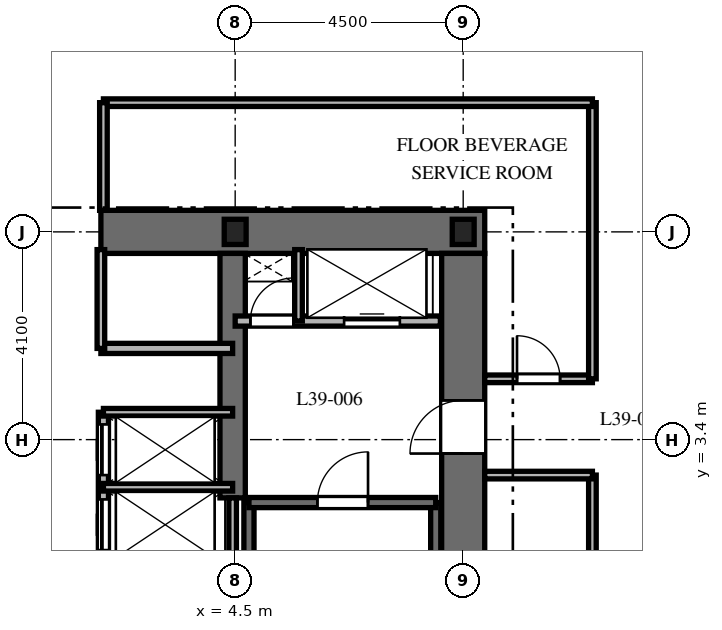
"""IFC4 building model, lengths in metres.
Left out: names, types, materials, properties, quantities, classifications, styles, units other than length and angle.
Written with IfcOpenShell. Run it as: python <this file> out.ifc"""

import sys

from ifc_helpers import new_model, si_unit, direction, frame, frame_2d, origin, origin_2d, place, context, subcontext, project, spatial, rectangle, i_section, extrude, element, fill, save


model = new_model("IFC4")
c1 = context("Model", 3, precision=1e-05, world=origin(), true_north=direction((0.0, 1.0)))
c2 = subcontext(c1, "Body", "Model", "MODEL_VIEW")
j1 = project(units=[si_unit("LENGTHUNIT", "METRE"), si_unit("PLANEANGLEUNIT", "RADIAN")], contexts=[c1])
p1 = place(None, origin())
s1 = spatial("IfcSite", under=j1, at=p1, CompositionType="ELEMENT")
p2 = place(p1, origin())
s2 = spatial("IfcBuilding", under=s1, at=p2, CompositionType="ELEMENT")
p3 = place(p2, frame((0.0, 0.0, 159.1)))
s3 = spatial("IfcBuildingStorey", under=s2, at=p3, CompositionType="ELEMENT", Elevation=159.1)
p4 = place(p3, frame((1.85, 7.5, 0.0), z_axis=(0.0, 0.0, 1.0), x_axis=(1.0, 0.0, 0.0)))
e1 = element("IfcWall", 1, at=p4, inside=s3, PredefinedType="SHEAR", context=c2, shape_type="SweptSolid", body=[
    extrude(rectangle(XDim=7.575, YDim=0.85, at=frame_2d((3.788, 0.0))), origin(), (0.0, 0.0, 1.0), 3.7),
])
p5 = place(p3, frame((9.0, -7.075, 0.0), z_axis=(0.0, 0.0, 1.0), x_axis=(0.0, 1.0, 0.0)))
e2 = element("IfcWall", 2, at=p5, inside=s3, PredefinedType="SHEAR", context=c2, shape_type="SweptSolid", body=[
    extrude(rectangle(XDim=14.15, YDim=0.85, at=frame_2d((7.075, 0.0))), origin(), (0.0, 0.0, 1.0), 3.7),
])
p6 = place(p5, frame((10.2, 0.0, 0.0)))
e3 = element("IfcOpeningElement", 3, at=p6, cuts=e2, PredefinedType="OPENING", context=c2, shape_type="SweptSolid", body=[
    extrude(rectangle(XDim=1.05, YDim=2.15, at=frame_2d((0.525, 1.075))), frame((0.0, 0.435, 0.0), z_axis=(0.0, -1.0, 0.0), x_axis=(1.0, 0.0, 0.0)), (0.0, 0.0, 1.0), 0.87),
])
p7 = place(p3, frame((4.45, 2.25, 0.0), z_axis=(0.0, 0.0, 1.0), x_axis=(0.0, 1.0, 0.0)))
e4 = element("IfcWall", 4, at=p7, inside=s3, PredefinedType="SHEAR", context=c2, shape_type="SweptSolid", body=[
    extrude(rectangle(XDim=4.825, YDim=0.5, at=frame_2d((2.413, 0.0))), origin(), (0.0, 0.0, 1.0), 3.7),
])
for number, where, z_axis, x_axis in (
    (5, (4.772, -6.985, 0.0), (0.0, 0.0, 1.0), (0.0, 1.0, 0.0)),
    (6, (8.458, -6.985, 0.0), (0.0, 0.0, 1.0), (0.0, 1.0, 0.0)),
):
    element("IfcWall", number, at=place(p3, frame(where, z_axis=z_axis, x_axis=x_axis)), inside=s3, PredefinedType="SHEAR", context=c2, shape_type="SweptSolid", body=[
        extrude(rectangle(XDim=9.143, YDim=0.2, at=frame_2d((4.572, 0.0))), origin(), (0.0, 0.0, 1.0), 3.7),
    ])
p8 = place(p3, frame((4.772, 2.158, 0.0), z_axis=(0.0, 0.0, 1.0), x_axis=(1.0, 0.0, 0.0)))
e7 = element("IfcWall", 7, at=p8, inside=s3, PredefinedType="SHEAR", context=c2, shape_type="SweptSolid", body=[
    extrude(rectangle(XDim=3.686, YDim=0.2, at=frame_2d((1.843, 0.0))), origin(), (0.0, 0.0, 1.0), 3.7),
])
p9 = place(p8, frame((1.35, 0.0, 0.0)))
e8 = element("IfcOpeningElement", 8, at=p9, cuts=e7, PredefinedType="OPENING", context=c2, shape_type="SweptSolid", body=[
    extrude(rectangle(XDim=1.0, YDim=2.15, at=frame_2d((0.5, 1.075))), frame((0.0, 0.11, 0.0), z_axis=(0.0, -1.0, 0.0), x_axis=(1.0, 0.0, 0.0)), (0.0, 0.0, 1.0), 0.22),
])
for number, where, z_axis, x_axis in (
    (9, (9.0, 7.5, 0.0), (0.0, 0.0, 1.0), (1.0, 0.0, 0.0)),
    (10, (4.5, 7.5, 0.0), (0.0, 0.0, 1.0), (1.0, 0.0, 0.0)),
):
    element("IfcColumn", number, at=place(p3, frame(where, z_axis=z_axis, x_axis=x_axis)), inside=s3, PredefinedType="COLUMN", context=c2, shape_type="SweptSolid", body=[
        extrude(i_section(OverallWidth=0.432, OverallDepth=0.498, WebThickness=0.056, FlangeThickness=0.089, at=origin_2d()), origin(), (0.0, 0.0, 1.0), 3.7),
    ])
p10 = place(p3, frame((4.5, 5.74, 0.0), z_axis=(0.0, 0.0, 1.0), x_axis=(1.0, 0.0, 0.0)))
e11 = element("IfcWall", 11, at=p10, inside=s3, PredefinedType="PARTITIONING", context=c2, shape_type="SweptSolid", body=[
    extrude(rectangle(XDim=4.05, YDim=0.2, at=frame_2d((2.025, 0.0))), origin(), (0.0, 0.0, 1.0), 3.4),
])
p11 = place(p10, frame((0.3, 0.0, 0.0)))
e12 = element("IfcOpeningElement", 12, at=p11, cuts=e11, PredefinedType="OPENING", context=c2, shape_type="SweptSolid", body=[
    extrude(rectangle(XDim=0.85, YDim=2.03, at=frame_2d((0.425, 1.015))), frame((0.0, 0.11, 0.0), z_axis=(0.0, -1.0, 0.0), x_axis=(1.0, 0.0, 0.0)), (0.0, 0.0, 1.0), 0.22),
])
p12 = place(p10, frame((2.15, 0.0, 0.0)))
e13 = element("IfcOpeningElement", 13, at=p12, cuts=e11, PredefinedType="OPENING", context=c2, shape_type="SweptSolid", body=[
    extrude(rectangle(XDim=1.1, YDim=2.2, at=frame_2d((0.55, 1.1))), frame((0.0, 0.11, 0.0), z_axis=(0.0, -1.0, 0.0), x_axis=(1.0, 0.0, 0.0)), (0.0, 0.0, 1.0), 0.22),
])
p13 = place(p3, frame((5.75, 5.74, 0.0), z_axis=(0.0, 0.0, 1.0), x_axis=(0.0, 1.0, 0.0)))
e14 = element("IfcWall", 14, at=p13, inside=s3, PredefinedType="PARTITIONING", context=c2, shape_type="SweptSolid", body=[
    extrude(rectangle(XDim=1.41, YDim=0.15, at=frame_2d((0.705, 0.0))), origin(), (0.0, 0.0, 1.0), 3.4),
])
p14 = place(p3, frame((1.85, 5.2, 0.0), z_axis=(0.0, 0.0, 1.0), x_axis=(1.0, 0.0, 0.0)))
e15 = element("IfcWall", 15, at=p14, inside=s3, PredefinedType="PARTITIONING", context=c2, shape_type="SweptSolid", body=[
    extrude(rectangle(XDim=2.6, YDim=0.2, at=frame_2d((1.3, 0.0))), origin(), (0.0, 0.0, 1.0), 3.4),
])
p15 = place(p3, frame((1.85, 5.2, 0.0), z_axis=(0.0, 0.0, 1.0), x_axis=(0.0, 1.0, 0.0)))
e16 = element("IfcWall", 16, at=p15, inside=s3, PredefinedType="PARTITIONING", context=c2, shape_type="SweptSolid", body=[
    extrude(rectangle(XDim=1.95, YDim=0.15, at=frame_2d((0.975, 0.0))), origin(), (0.0, 0.0, 1.0), 3.4),
])
p16 = place(p3, frame((4.45, -1.972, 0.0), z_axis=(0.0, 0.0, 1.0), x_axis=(0.0, 1.0, 0.0)))
e17 = element("IfcWall", 17, at=p16, inside=s3, PredefinedType="PARTITIONING", context=c2, shape_type="SweptSolid", body=[
    extrude(rectangle(XDim=4.222, YDim=0.15, at=frame_2d((2.111, 0.0))), origin(), (0.0, 0.0, 1.0), 3.4),
])
p17 = place(p3, frame((1.9, -0.5, 0.0), z_axis=(0.0, 0.0, 1.0), x_axis=(0.0, 1.0, 0.0)))
e18 = element("IfcWall", 18, at=p17, inside=s3, PredefinedType="PARTITIONING", context=c2, shape_type="SweptSolid", body=[
    extrude(rectangle(XDim=4.44, YDim=0.2, at=frame_2d((2.22, 0.0))), origin(), (0.0, 0.0, 1.0), 3.4),
])
p18 = place(p17, frame((0.24, 0.0, 0.0)))
e19 = element("IfcOpeningElement", 19, at=p18, cuts=e18, PredefinedType="OPENING", context=c2, shape_type="SweptSolid", body=[
    extrude(rectangle(XDim=1.0, YDim=2.2, at=frame_2d((0.5, 1.1))), frame((0.0, 0.11, 0.0), z_axis=(0.0, -1.0, 0.0), x_axis=(1.0, 0.0, 0.0)), (0.0, 0.0, 1.0), 0.22),
])
p19 = place(p17, frame((1.72, 0.0, 0.0)))
e20 = element("IfcOpeningElement", 20, at=p19, cuts=e18, PredefinedType="OPENING", context=c2, shape_type="SweptSolid", body=[
    extrude(rectangle(XDim=1.0, YDim=2.2, at=frame_2d((0.5, 1.1))), frame((0.0, 0.11, 0.0), z_axis=(0.0, -1.0, 0.0), x_axis=(1.0, 0.0, 0.0)), (0.0, 0.0, 1.0), 0.22),
])
p20 = place(p17, frame((3.2, 0.0, 0.0)))
e21 = element("IfcOpeningElement", 21, at=p20, cuts=e18, PredefinedType="OPENING", context=c2, shape_type="SweptSolid", body=[
    extrude(rectangle(XDim=1.0, YDim=2.2, at=frame_2d((0.5, 1.1))), frame((0.0, 0.11, 0.0), z_axis=(0.0, -1.0, 0.0), x_axis=(1.0, 0.0, 0.0)), (0.0, 0.0, 1.0), 0.22),
])
for number, where, z_axis, x_axis in (
    (22, (1.9, 3.94, 0.0), (0.0, 0.0, 1.0), (1.0, 0.0, 0.0)),
    (23, (1.9, 2.46, 0.0), (0.0, 0.0, 1.0), (1.0, 0.0, 0.0)),
):
    element("IfcWall", number, at=place(p3, frame(where, z_axis=z_axis, x_axis=x_axis)), inside=s3, PredefinedType="PARTITIONING", context=c2, shape_type="SweptSolid", body=[
        extrude(rectangle(XDim=2.55, YDim=0.15, at=frame_2d((1.275, 0.0))), origin(), (0.0, 0.0, 1.0), 3.4),
    ])
p21 = place(p3, frame((11.55, -10.05, 0.0), z_axis=(0.0, 0.0, 1.0), x_axis=(0.0, 1.0, 0.0)))
e24 = element("IfcWall", 24, at=p21, inside=s3, PredefinedType="PARTITIONING", context=c2, shape_type="SweptSolid", body=[
    extrude(rectangle(XDim=12.75, YDim=0.15, at=frame_2d((6.375, 0.0))), origin(), (0.0, 0.0, 1.0), 2.84),
])
p22 = place(p21, frame((5.95, 0.0, 0.0)))
e25 = element("IfcOpeningElement", 25, at=p22, cuts=e24, PredefinedType="OPENING", context=c2, shape_type="SweptSolid", body=[
    extrude(rectangle(XDim=0.85, YDim=2.03, at=frame_2d((0.425, 1.015))), frame((0.0, 0.085, 0.0), z_axis=(0.0, -1.0, 0.0), x_axis=(1.0, 0.0, 0.0)), (0.0, 0.0, 1.0), 0.17),
])
p23 = place(p3, frame((11.55, 2.7, 0.0), z_axis=(0.0, 0.0, 1.0), x_axis=(-1.0, 0.0, 0.0)))
e26 = element("IfcWall", 26, at=p23, inside=s3, PredefinedType="PARTITIONING", context=c2, shape_type="SweptSolid", body=[
    extrude(rectangle(XDim=2.125, YDim=0.15, at=frame_2d((1.062, 0.0))), origin(), (0.0, 0.0, 1.0), 3.4),
])
p24 = place(p3, frame((9.425, 4.6, 0.0), z_axis=(0.0, 0.0, 1.0), x_axis=(1.0, 0.0, 0.0)))
e27 = element("IfcWall", 27, at=p24, inside=s3, PredefinedType="PARTITIONING", context=c2, shape_type="SweptSolid", body=[
    extrude(rectangle(XDim=2.125, YDim=0.15, at=frame_2d((1.062, 0.0))), origin(), (0.0, 0.0, 1.0), 3.4),
])
p25 = place(p24, frame((0.637, 0.0, 0.0)))
e28 = element("IfcOpeningElement", 28, at=p25, cuts=e27, PredefinedType="OPENING", context=c2, shape_type="SweptSolid", body=[
    extrude(rectangle(XDim=0.85, YDim=2.03, at=frame_2d((0.425, 1.015))), frame((0.0, 0.085, 0.0), z_axis=(0.0, -1.0, 0.0), x_axis=(1.0, 0.0, 0.0)), (0.0, 0.0, 1.0), 0.17),
])
p26 = place(p3, frame((11.55, 4.6, 0.0), z_axis=(0.0, 0.0, 1.0), x_axis=(0.0, 1.0, 0.0)))
e29 = element("IfcWall", 29, at=p26, inside=s3, PredefinedType="PARTITIONING", context=c2, shape_type="SweptSolid", body=[
    extrude(rectangle(XDim=5.45, YDim=0.15, at=frame_2d((2.725, 0.0))), origin(), (0.0, 0.0, 1.0), 2.84),
])
p27 = place(p3, frame((11.55, 10.05, 0.0), z_axis=(0.0, 0.0, 1.0), x_axis=(-1.0, 0.0, 0.0)))
e30 = element("IfcWall", 30, at=p27, inside=s3, PredefinedType="PARTITIONING", context=c2, shape_type="SweptSolid", body=[
    extrude(rectangle(XDim=9.65, YDim=0.15, at=frame_2d((4.825, 0.0))), origin(), (0.0, 0.0, 1.0), 2.84),
])
p28 = place(p3, frame((1.9, 10.05, 0.0), z_axis=(0.0, 0.0, 1.0), x_axis=(0.0, -1.0, 0.0)))
e31 = element("IfcWall", 31, at=p28, inside=s3, PredefinedType="PARTITIONING", context=c2, shape_type="SweptSolid", body=[
    extrude(rectangle(XDim=2.125, YDim=0.15, at=frame_2d((1.062, 0.0))), origin(), (0.0, 0.0, 1.0), 3.4),
])
p29 = place(p9, origin())
e32 = element("IfcDoor", 32, at=p29, inside=s3, OperationType="SINGLE_SWING_RIGHT", PredefinedType="DOOR", context=c2, shape_type="SweptSolid", body=[
    extrude(rectangle(XDim=1.0, YDim=2.15, at=frame_2d((0.5, 1.075))), frame((0.0, 0.025, 0.0), z_axis=(0.0, -1.0, 0.0), x_axis=(1.0, 0.0, 0.0)), (0.0, 0.0, 1.0), 0.05),
])
fill(e8, e32)
p30 = place(p6, origin())
e33 = element("IfcDoor", 33, at=p30, inside=s3, OperationType="SINGLE_SWING_LEFT", PredefinedType="DOOR", context=c2, shape_type="SweptSolid", body=[
    extrude(rectangle(XDim=1.05, YDim=2.15, at=frame_2d((0.525, 1.075))), frame((0.0, 0.025, 0.0), z_axis=(0.0, -1.0, 0.0), x_axis=(1.0, 0.0, 0.0)), (0.0, 0.0, 1.0), 0.05),
])
fill(e3, e33)
p31 = place(p11, origin())
e34 = element("IfcDoor", 34, at=p31, inside=s3, OperationType="SINGLE_SWING_RIGHT", PredefinedType="DOOR", context=c2, shape_type="SweptSolid", body=[
    extrude(rectangle(XDim=0.85, YDim=2.03, at=frame_2d((0.425, 1.015))), frame((0.0, 0.025, 0.0), z_axis=(0.0, -1.0, 0.0), x_axis=(1.0, 0.0, 0.0)), (0.0, 0.0, 1.0), 0.05),
])
fill(e12, e34)
p32 = place(p12, origin())
e35 = element("IfcDoor", 35, at=p32, inside=s3, OperationType="SLIDING_TO_RIGHT", PredefinedType="DOOR", context=c2, shape_type="SweptSolid", body=[
    extrude(rectangle(XDim=1.1, YDim=2.2, at=frame_2d((0.55, 1.1))), frame((0.0, 0.025, 0.0), z_axis=(0.0, -1.0, 0.0), x_axis=(1.0, 0.0, 0.0)), (0.0, 0.0, 1.0), 0.05),
])
fill(e13, e35)
p33 = place(p19, origin())
e36 = element("IfcDoor", 36, at=p33, inside=s3, OperationType="SLIDING_TO_RIGHT", PredefinedType="DOOR", context=c2, shape_type="SweptSolid", body=[
    extrude(rectangle(XDim=1.0, YDim=2.2, at=frame_2d((0.5, 1.1))), frame((0.0, 0.025, 0.0), z_axis=(0.0, -1.0, 0.0), x_axis=(1.0, 0.0, 0.0)), (0.0, 0.0, 1.0), 0.05),
])
fill(e20, e36)
p34 = place(p20, origin())
e37 = element("IfcDoor", 37, at=p34, inside=s3, OperationType="SLIDING_TO_RIGHT", PredefinedType="DOOR", context=c2, shape_type="SweptSolid", body=[
    extrude(rectangle(XDim=1.0, YDim=2.2, at=frame_2d((0.5, 1.1))), frame((0.0, 0.025, 0.0), z_axis=(0.0, -1.0, 0.0), x_axis=(1.0, 0.0, 0.0)), (0.0, 0.0, 1.0), 0.05),
])
fill(e21, e37)
p35 = place(p25, origin())
e38 = element("IfcDoor", 38, at=p35, inside=s3, OperationType="SINGLE_SWING_LEFT", PredefinedType="DOOR", context=c2, shape_type="SweptSolid", body=[
    extrude(rectangle(XDim=0.85, YDim=2.03, at=frame_2d((0.425, 1.015))), frame((0.0, 0.025, 0.0), z_axis=(0.0, -1.0, 0.0), x_axis=(1.0, 0.0, 0.0)), (0.0, 0.0, 1.0), 0.05),
])
fill(e28, e38)
save(model, sys.argv[1])
